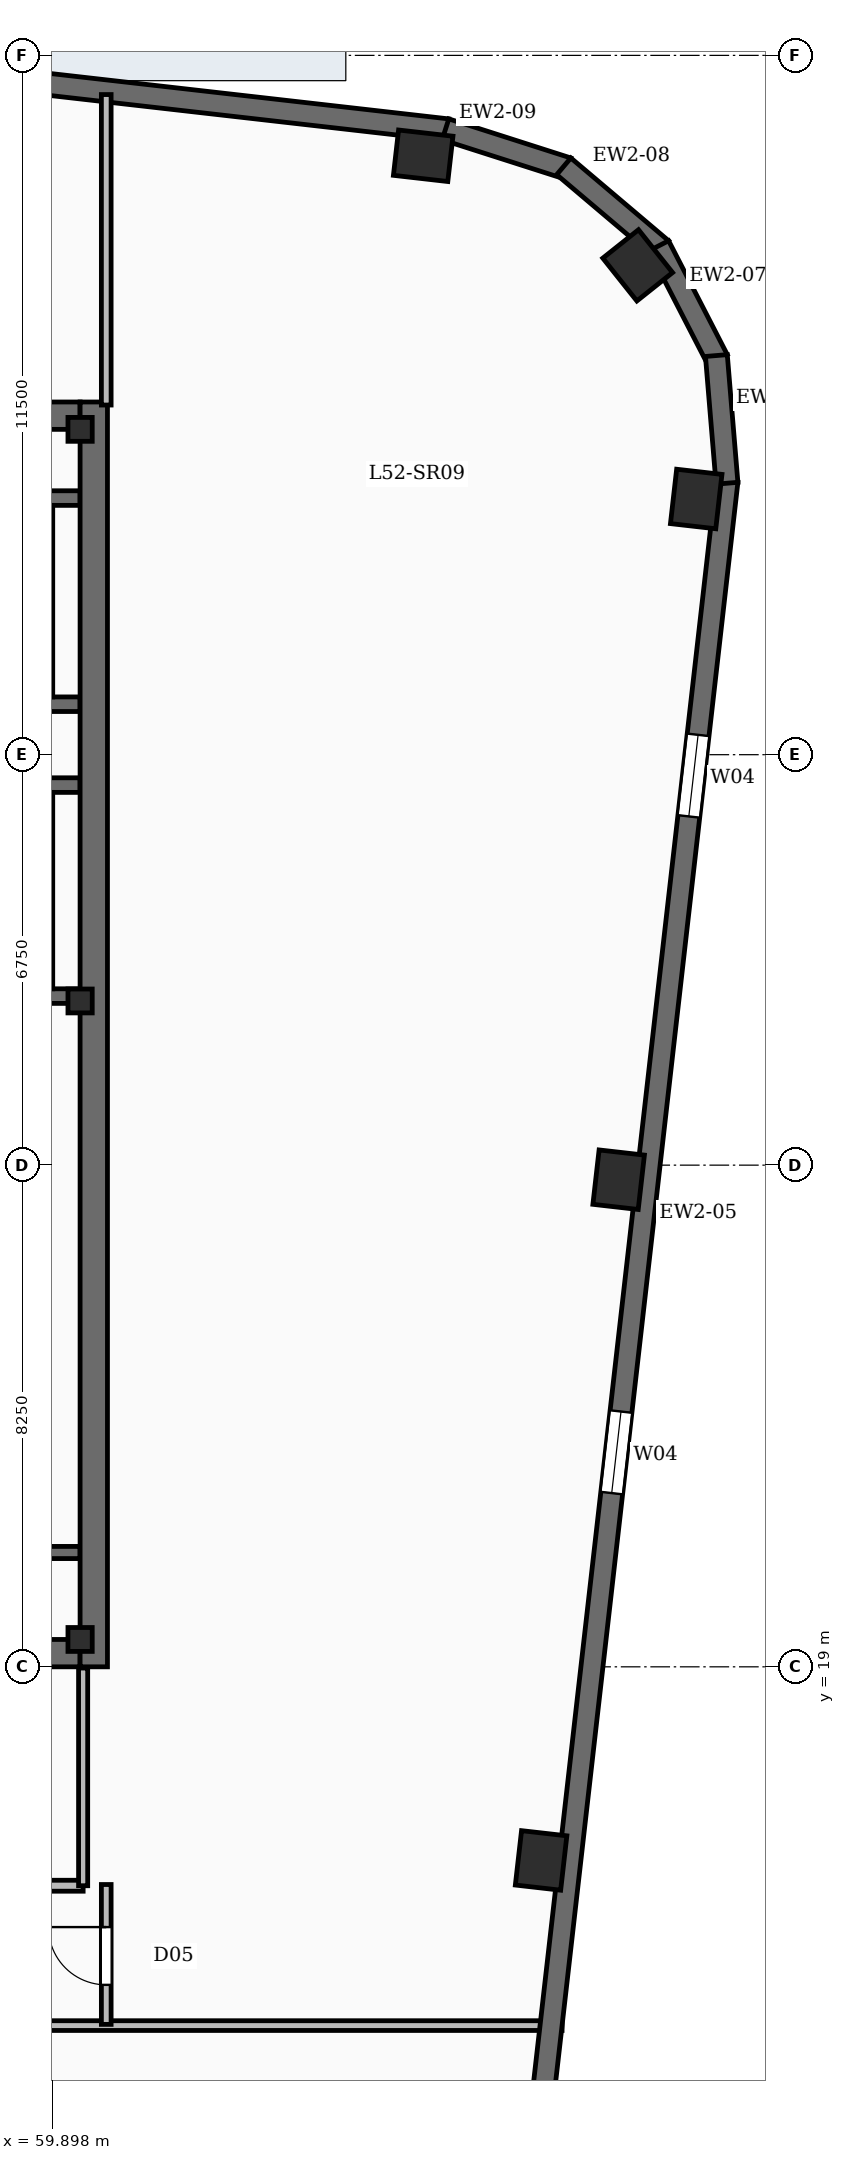
"""IFC4 building model, lengths in metres.
Left out: names, types, materials, properties, quantities, classifications, styles, units other than length and angle.
Written with IfcOpenShell. Run it as: python <this file> out.ifc"""

import sys

from ifc_helpers import new_model, si_unit, direction, frame, frame_2d, origin, origin_2d, place, context, subcontext, project, spatial, rectangle, i_section, extrude, element, fill, save


model = new_model("IFC4")
c1 = context("Model", 3, precision=1e-05, world=origin(), true_north=direction((0.0, 1.0)))
c2 = subcontext(c1, "Body", "Model", "MODEL_VIEW")
j1 = project(units=[si_unit("LENGTHUNIT", "METRE"), si_unit("PLANEANGLEUNIT", "RADIAN")], contexts=[c1])
p1 = place(None, origin())
s1 = spatial("IfcSite", under=j1, at=p1, CompositionType="ELEMENT")
p2 = place(p1, origin())
s2 = spatial("IfcBuilding", under=s1, at=p2, CompositionType="ELEMENT")
p3 = place(p2, frame((0.0, 0.0, 216.15)))
s3 = spatial("IfcBuildingStorey", under=s2, at=p3, CompositionType="ELEMENT", Elevation=216.15)
p4 = place(p3, frame((60.575, 19.0, -0.45), z_axis=(0.0, 0.0, 1.0), x_axis=(0.0, 1.0, 0.0)))
e1 = element("IfcWall", 1, at=p4, inside=s3, PredefinedType="SHEAR", context=c2, shape_type="SweptSolid", body=[
    extrude(rectangle(XDim=20.8, YDim=0.45, at=frame_2d((10.4, 0.0))), origin(), (0.0, 0.0, 1.0), 4.98),
])
for number, where, z_axis, x_axis in (
    (2, (50.55, 19.225, -0.45), (0.0, 0.0, 1.0), (1.0, 0.0, 0.0)),
    (3, (50.55, 39.575, -0.45), (0.0, 0.0, 1.0), (1.0, 0.0, 0.0)),
):
    element("IfcWall", number, at=place(p3, frame(where, z_axis=z_axis, x_axis=x_axis)), inside=s3, PredefinedType="SHEAR", context=c2, shape_type="SweptSolid", body=[
        extrude(rectangle(XDim=9.8, YDim=0.45, at=frame_2d((4.9, 0.0))), origin(), (0.0, 0.0, 1.0), 4.98),
    ])
for number, where, z_axis, x_axis in (
    (4, (60.35, 19.45, -0.45), (0.0, 0.0, 1.0), (1.0, 0.0, 0.0)),
    (5, (60.35, 29.95, -0.45), (0.0, 0.0, 1.0), (1.0, 0.0, 0.0)),
    (6, (60.35, 39.35, -0.45), (0.0, 0.0, 1.0), (1.0, 0.0, 0.0)),
):
    element("IfcColumn", number, at=place(p3, frame(where, z_axis=z_axis, x_axis=x_axis)), inside=s3, PredefinedType="COLUMN", context=c2, shape_type="SweptSolid", body=[
        extrude(i_section(OverallWidth=0.399, OverallDepth=0.393, WebThickness=0.023, FlangeThickness=0.037, FilletRadius=0.02, at=origin_2d()), origin(), (0.0, 0.0, 1.0), 4.98),
    ])
for number, where, z_axis, x_axis in (
    (7, (67.931, 15.816, -0.45), (0.0, 0.0, 1.0), (0.113, 0.994, 0.0)),
    (8, (69.207, 27.01, -0.45), (0.0, 0.0, 1.0), (0.113, 0.994, 0.0)),
    (9, (70.482, 38.205, -0.45), (0.0, 0.0, 1.0), (0.113, 0.994, 0.0)),
    (10, (69.52, 42.047, -0.45), (0.0, 0.0, 1.0), (-0.623, 0.783, 0.0)),
    (11, (65.992, 43.849, -0.45), (0.0, 0.0, 1.0), (0.994, -0.113, 0.0)),
):
    element("IfcColumn", number, at=place(p3, frame(where, z_axis=z_axis, x_axis=x_axis)), inside=s3, PredefinedType="COLUMN", context=c2, shape_type="SweptSolid", body=[
        extrude(rectangle(XDim=0.9, YDim=0.75, at=origin_2d()), origin(), (0.0, 0.0, 1.0), 4.98),
    ])
p5 = place(p3, frame((70.989, 38.499, 0.0), z_axis=(0.0, 0.0, 1.0), x_axis=(-0.113203107947, -0.993571867733, 0.0)))
e12 = element("IfcWall", 12, at=p5, inside=s3, PredefinedType="SOLIDWALL", context=c2, shape_type="SweptSolid", body=[
    extrude(rectangle(XDim=34.5, YDim=0.36, at=frame_2d((17.25, 0.0))), origin(), (0.0, 0.0, 1.0), 4.53),
])
p6 = place(p5, frame((4.2, 0.0, 0.88)))
e13 = element("IfcOpeningElement", 13, at=p6, cuts=e12, PredefinedType="OPENING", context=c2, shape_type="SweptSolid", body=[
    extrude(rectangle(XDim=1.35, YDim=2.2, at=frame_2d((0.675, 1.1))), frame((0.0, 0.19, 0.0), z_axis=(0.0, -1.0, 0.0), x_axis=(1.0, 0.0, 0.0)), (0.0, 0.0, 1.0), 0.38),
])
p7 = place(p5, frame((15.4, 0.0, 0.88)))
e14 = element("IfcOpeningElement", 14, at=p7, cuts=e12, PredefinedType="OPENING", context=c2, shape_type="SweptSolid", body=[
    extrude(rectangle(XDim=1.35, YDim=2.2, at=frame_2d((0.675, 1.1))), frame((0.0, 0.19, 0.0), z_axis=(0.0, -1.0, 0.0), x_axis=(1.0, 0.0, 0.0)), (0.0, 0.0, 1.0), 0.38),
])
p8 = place(p5, frame((26.6, 0.0, 0.88)))
e15 = element("IfcOpeningElement", 15, at=p8, cuts=e12, PredefinedType="OPENING", context=c2, shape_type="SweptSolid", body=[
    extrude(rectangle(XDim=1.35, YDim=2.2, at=frame_2d((0.675, 1.1))), frame((0.0, 0.19, 0.0), z_axis=(0.0, -1.0, 0.0), x_axis=(1.0, 0.0, 0.0)), (0.0, 0.0, 1.0), 0.38),
])
p9 = place(p3, frame((70.814, 40.564, 0.0), z_axis=(0.0, 0.0, 1.0), x_axis=(0.082853678144, -0.996561723135, 0.0)))
e16 = element("IfcWall", 16, at=p9, inside=s3, PredefinedType="SOLIDWALL", context=c2, shape_type="SweptSolid", body=[
    extrude(rectangle(XDim=2.107, YDim=0.36, at=frame_2d((1.053, 0.0))), origin(), (0.0, 0.0, 1.0), 4.53),
])
for number, where, z_axis, x_axis in (
    (17, (69.868, 42.369, 0.0), (0.0, 0.0, 1.0), (0.458, -0.889, 0.0)),
    (18, (68.304, 43.676, 0.0), (0.0, 0.0, 1.0), (0.763, -0.646, 0.0)),
    (19, (66.359, 44.284, 0.0), (0.0, 0.0, 1.0), (0.952, -0.305, 0.0)),
):
    element("IfcWall", number, at=place(p3, frame(where, z_axis=z_axis, x_axis=x_axis)), inside=s3, PredefinedType="SOLIDWALL", context=c2, shape_type="SweptSolid", body=[
        extrude(rectangle(XDim=2.107, YDim=0.36, at=frame_2d((1.054, 0.0))), origin(), (0.0, 0.0, 1.0), 4.53),
    ])
p10 = place(p3, frame((19.894, 49.575, 0.0), z_axis=(0.0, 0.0, 1.0), x_axis=(0.993571439016, -0.113206870688, 0.0)))
e20 = element("IfcWall", 20, at=p10, inside=s3, PredefinedType="SOLIDWALL", context=c2, shape_type="SweptSolid", body=[
    extrude(rectangle(XDim=46.8, YDim=0.36, at=frame_2d((23.4, 0.0))), origin(), (0.0, 0.0, 1.0), 4.53),
])
p11 = place(p10, frame((26.3, 0.0, 0.0)))
e21 = element("IfcOpeningElement", 21, at=p11, cuts=e20, PredefinedType="OPENING", context=c2, shape_type="SweptSolid", body=[
    extrude(rectangle(XDim=1.8, YDim=2.25, at=frame_2d((0.9, 1.125))), frame((0.0, 0.19, 0.0), z_axis=(0.0, -1.0, 0.0), x_axis=(1.0, 0.0, 0.0)), (0.0, 0.0, 1.0), 0.38),
])
p12 = place(p10, frame((2.6, 0.0, 0.85)))
e22 = element("IfcOpeningElement", 22, at=p12, cuts=e20, PredefinedType="OPENING", context=c2, shape_type="SweptSolid", body=[
    extrude(rectangle(XDim=2.4, YDim=3.0, at=frame_2d((1.2, 1.5))), frame((0.0, 0.19, 0.0), z_axis=(0.0, -1.0, 0.0), x_axis=(1.0, 0.0, 0.0)), (0.0, 0.0, 1.0), 0.38),
])
p13 = place(p10, frame((8.0, 0.0, 0.85)))
e23 = element("IfcOpeningElement", 23, at=p13, cuts=e20, PredefinedType="OPENING", context=c2, shape_type="SweptSolid", body=[
    extrude(rectangle(XDim=2.4, YDim=3.0, at=frame_2d((1.2, 1.5))), frame((0.0, 0.19, 0.0), z_axis=(0.0, -1.0, 0.0), x_axis=(1.0, 0.0, 0.0)), (0.0, 0.0, 1.0), 0.38),
])
p14 = place(p10, frame((13.4, 0.0, 0.85)))
e24 = element("IfcOpeningElement", 24, at=p14, cuts=e20, PredefinedType="OPENING", context=c2, shape_type="SweptSolid", body=[
    extrude(rectangle(XDim=2.4, YDim=3.0, at=frame_2d((1.2, 1.5))), frame((0.0, 0.19, 0.0), z_axis=(0.0, -1.0, 0.0), x_axis=(1.0, 0.0, 0.0)), (0.0, 0.0, 1.0), 0.38),
])
p15 = place(p10, frame((29.6, 0.0, 0.85)))
e25 = element("IfcOpeningElement", 25, at=p15, cuts=e20, PredefinedType="OPENING", context=c2, shape_type="SweptSolid", body=[
    extrude(rectangle(XDim=2.4, YDim=3.0, at=frame_2d((1.2, 1.5))), frame((0.0, 0.19, 0.0), z_axis=(0.0, -1.0, 0.0), x_axis=(1.0, 0.0, 0.0)), (0.0, 0.0, 1.0), 0.38),
])
p16 = place(p3, frame((60.35, 30.03, 0.0), z_axis=(0.0, 0.0, 1.0), x_axis=(-1.0, 0.0, 0.0)))
e26 = element("IfcWall", 26, at=p16, inside=s3, PredefinedType="SOLIDWALL", context=c2, shape_type="SweptSolid", body=[
    extrude(rectangle(XDim=9.8, YDim=0.24, at=frame_2d((4.9, 0.0))), origin(), (0.0, 0.0, 1.0), 4.53),
])
p17 = place(p16, frame((7.83, 0.0, 0.0)))
e27 = element("IfcOpeningElement", 27, at=p17, cuts=e26, PredefinedType="OPENING", context=c2, shape_type="SweptSolid", body=[
    extrude(rectangle(XDim=1.1, YDim=2.15, at=frame_2d((0.55, 1.075))), frame((0.0, 0.13, 0.0), z_axis=(0.0, -1.0, 0.0), x_axis=(1.0, 0.0, 0.0)), (0.0, 0.0, 1.0), 0.26),
])
p18 = place(p3, frame((50.55, 33.5, 0.0), z_axis=(0.0, 0.0, 1.0), x_axis=(1.0, 0.0, 0.0)))
e28 = element("IfcWall", 28, at=p18, inside=s3, PredefinedType="SOLIDWALL", context=c2, shape_type="SweptSolid", body=[
    extrude(rectangle(XDim=9.8, YDim=0.24, at=frame_2d((4.9, 0.0))), origin(), (0.0, 0.0, 1.0), 4.53),
])
p19 = place(p3, frame((59.78, 30.15, 0.0), z_axis=(0.0, 0.0, 1.0), x_axis=(0.0, 1.0, 0.0)))
e29 = element("IfcWall", 29, at=p19, inside=s3, PredefinedType="SOLIDWALL", context=c2, shape_type="SweptSolid", body=[
    extrude(rectangle(XDim=3.23, YDim=0.24, at=frame_2d((1.615, 0.0))), origin(), (0.0, 0.0, 1.0), 4.53),
])
p20 = place(p3, frame((60.35, 34.83, 0.0), z_axis=(0.0, 0.0, 1.0), x_axis=(-1.0, 0.0, 0.0)))
e30 = element("IfcWall", 30, at=p20, inside=s3, PredefinedType="SOLIDWALL", context=c2, shape_type="SweptSolid", body=[
    extrude(rectangle(XDim=9.8, YDim=0.24, at=frame_2d((4.9, 0.0))), origin(), (0.0, 0.0, 1.0), 4.53),
])
p21 = place(p20, frame((7.87, 0.0, 0.0)))
e31 = element("IfcOpeningElement", 31, at=p21, cuts=e30, PredefinedType="OPENING", context=c2, shape_type="SweptSolid", body=[
    extrude(rectangle(XDim=1.1, YDim=2.15, at=frame_2d((0.55, 1.075))), frame((0.0, 0.13, 0.0), z_axis=(0.0, -1.0, 0.0), x_axis=(1.0, 0.0, 0.0)), (0.0, 0.0, 1.0), 0.26),
])
p22 = place(p3, frame((50.55, 38.22, 0.0), z_axis=(0.0, 0.0, 1.0), x_axis=(1.0, 0.0, 0.0)))
e32 = element("IfcWall", 32, at=p22, inside=s3, PredefinedType="SOLIDWALL", context=c2, shape_type="SweptSolid", body=[
    extrude(rectangle(XDim=9.8, YDim=0.24, at=frame_2d((4.9, 0.0))), origin(), (0.0, 0.0, 1.0), 4.53),
])
p23 = place(p3, frame((59.78, 34.95, 0.0), z_axis=(0.0, 0.0, 1.0), x_axis=(0.0, 1.0, 0.0)))
e33 = element("IfcWall", 33, at=p23, inside=s3, PredefinedType="SOLIDWALL", context=c2, shape_type="SweptSolid", body=[
    extrude(rectangle(XDim=3.15, YDim=0.24, at=frame_2d((1.575, 0.0))), origin(), (0.0, 0.0, 1.0), 4.53),
])
p24 = place(p3, frame((50.55, 20.88, 0.0), z_axis=(0.0, 0.0, 1.0), x_axis=(1.0, 0.0, 0.0)))
e34 = element("IfcWall", 34, at=p24, inside=s3, PredefinedType="SOLIDWALL", context=c2, shape_type="SweptSolid", body=[
    extrude(rectangle(XDim=9.8, YDim=0.2, at=frame_2d((4.9, 0.0))), origin(), (0.0, 0.0, 1.0), 3.59),
])
p25 = place(p24, frame((1.4, 0.0, 0.0)))
e35 = element("IfcOpeningElement", 35, at=p25, cuts=e34, PredefinedType="OPENING", context=c2, shape_type="SweptSolid", body=[
    extrude(rectangle(XDim=1.05, YDim=2.15, at=frame_2d((0.525, 1.075))), frame((0.0, 0.11, 0.0), z_axis=(0.0, -1.0, 0.0), x_axis=(1.0, 0.0, 0.0)), (0.0, 0.0, 1.0), 0.22),
])
p26 = place(p24, frame((5.5, 0.0, 0.0)))
e36 = element("IfcOpeningElement", 36, at=p26, cuts=e34, PredefinedType="OPENING", context=c2, shape_type="SweptSolid", body=[
    extrude(rectangle(XDim=1.05, YDim=2.15, at=frame_2d((0.525, 1.075))), frame((0.0, 0.11, 0.0), z_axis=(0.0, -1.0, 0.0), x_axis=(1.0, 0.0, 0.0)), (0.0, 0.0, 1.0), 0.22),
])
p27 = place(p3, frame((50.4, 15.4, 0.0), z_axis=(0.0, 0.0, 1.0), x_axis=(1.0, 0.0, 0.0)))
e37 = element("IfcWall", 37, at=p27, inside=s3, PredefinedType="SOLIDWALL", context=c2, shape_type="SweptSolid", body=[
    extrude(rectangle(XDim=10.0, YDim=0.18, at=frame_2d((5.0, 0.0))), origin(), (0.0, 0.0, 1.0), 3.59),
])
p28 = place(p27, frame((1.94, 0.0, 0.0)))
e38 = element("IfcOpeningElement", 38, at=p28, cuts=e37, PredefinedType="OPENING", context=c2, shape_type="SweptSolid", body=[
    extrude(rectangle(XDim=0.92, YDim=2.1, at=frame_2d((0.46, 1.05))), frame((0.0, 0.1, 0.0), z_axis=(0.0, -1.0, 0.0), x_axis=(1.0, 0.0, 0.0)), (0.0, 0.0, 1.0), 0.2),
])
p29 = place(p27, frame((6.97, 0.0, 0.0)))
e39 = element("IfcOpeningElement", 39, at=p29, cuts=e37, PredefinedType="OPENING", context=c2, shape_type="SweptSolid", body=[
    extrude(rectangle(XDim=0.86, YDim=2.05, at=frame_2d((0.43, 1.025))), frame((0.0, 0.1, 0.0), z_axis=(0.0, -1.0, 0.0), x_axis=(1.0, 0.0, 0.0)), (0.0, 0.0, 1.0), 0.2),
])
p30 = place(p3, frame((60.4, 15.4, 0.0), z_axis=(0.0, 0.0, 1.0), x_axis=(0.0, 1.0, 0.0)))
e40 = element("IfcWall", 40, at=p30, inside=s3, PredefinedType="PARTITIONING", context=c2, shape_type="SweptSolid", body=[
    extrude(rectangle(XDim=3.58, YDim=0.15, at=frame_2d((1.79, 0.0))), origin(), (0.0, 0.0, 1.0), 3.59),
])
p31 = place(p3, frame((10.303, 13.1, 0.0), z_axis=(0.0, 0.0, 1.0), x_axis=(1.0, 0.0, 0.0)))
e41 = element("IfcWall", 41, at=p31, inside=s3, PredefinedType="PARTITIONING", context=c2, shape_type="SweptSolid", body=[
    extrude(rectangle(XDim=57.973, YDim=0.16, at=frame_2d((28.986, 0.0))), origin(), (0.0, 0.0, 1.0), 3.59),
])
p32 = place(p31, frame((14.697, 0.0, 0.0)))
e42 = element("IfcOpeningElement", 42, at=p32, cuts=e41, PredefinedType="OPENING", context=c2, shape_type="SweptSolid", body=[
    extrude(rectangle(XDim=1.6, YDim=2.15, at=frame_2d((0.8, 1.075))), frame((0.0, 0.09, 0.0), z_axis=(0.0, -1.0, 0.0), x_axis=(1.0, 0.0, 0.0)), (0.0, 0.0, 1.0), 0.18),
])
p33 = place(p31, frame((35.697, 0.0, 0.0)))
e43 = element("IfcOpeningElement", 43, at=p33, cuts=e41, PredefinedType="OPENING", context=c2, shape_type="SweptSolid", body=[
    extrude(rectangle(XDim=1.6, YDim=2.15, at=frame_2d((0.8, 1.075))), frame((0.0, 0.09, 0.0), z_axis=(0.0, -1.0, 0.0), x_axis=(1.0, 0.0, 0.0)), (0.0, 0.0, 1.0), 0.18),
])
p34 = place(p3, frame((60.78, 39.75, 0.0), z_axis=(0.0, 0.0, 1.0), x_axis=(0.0, 1.0, 0.0)))
e44 = element("IfcWall", 44, at=p34, inside=s3, PredefinedType="PARTITIONING", context=c2, shape_type="SweptSolid", body=[
    extrude(rectangle(XDim=5.106, YDim=0.16, at=frame_2d((2.553, 0.0))), origin(), (0.0, 0.0, 1.0), 3.59),
])
p35 = place(p3, frame((60.78, 13.12, 0.0), z_axis=(0.0, 0.0, 1.0), x_axis=(0.0, 1.0, 0.0)))
e45 = element("IfcWall", 45, at=p35, inside=s3, PredefinedType="PARTITIONING", context=c2, shape_type="SweptSolid", body=[
    extrude(rectangle(XDim=2.3, YDim=0.16, at=frame_2d((1.15, 0.0))), origin(), (0.0, 0.0, 1.0), 3.59),
])
p36 = place(p35, frame((0.65, 0.0, 0.0)))
e46 = element("IfcOpeningElement", 46, at=p36, cuts=e45, PredefinedType="OPENING", context=c2, shape_type="SweptSolid", body=[
    extrude(rectangle(XDim=0.95, YDim=2.15, at=frame_2d((0.475, 1.075))), frame((0.0, 0.09, 0.0), z_axis=(0.0, -1.0, 0.0), x_axis=(1.0, 0.0, 0.0)), (0.0, 0.0, 1.0), 0.18),
])
p37 = place(p6, origin())
e47 = element("IfcWindow", 47, at=p37, inside=s3, PartitioningType="SINGLE_PANEL", PredefinedType="WINDOW", context=c2, shape_type="SweptSolid", body=[
    extrude(rectangle(XDim=1.35, YDim=2.2, at=frame_2d((0.675, 1.1))), frame((0.0, 0.03, 0.0), z_axis=(0.0, -1.0, 0.0), x_axis=(1.0, 0.0, 0.0)), (0.0, 0.0, 1.0), 0.06),
])
fill(e13, e47)
p38 = place(p7, origin())
e48 = element("IfcWindow", 48, at=p38, inside=s3, PartitioningType="SINGLE_PANEL", PredefinedType="WINDOW", context=c2, shape_type="SweptSolid", body=[
    extrude(rectangle(XDim=1.35, YDim=2.2, at=frame_2d((0.675, 1.1))), frame((0.0, 0.03, 0.0), z_axis=(0.0, -1.0, 0.0), x_axis=(1.0, 0.0, 0.0)), (0.0, 0.0, 1.0), 0.06),
])
fill(e14, e48)
p39 = place(p36, origin())
e49 = element("IfcDoor", 49, at=p39, inside=s3, OperationType="SINGLE_SWING_RIGHT", PredefinedType="DOOR", context=c2, shape_type="SweptSolid", body=[
    extrude(rectangle(XDim=0.95, YDim=2.15, at=frame_2d((0.475, 1.075))), frame((0.0, 0.025, 0.0), z_axis=(0.0, -1.0, 0.0), x_axis=(1.0, 0.0, 0.0)), (0.0, 0.0, 1.0), 0.05),
])
fill(e46, e49)
save(model, sys.argv[1])
